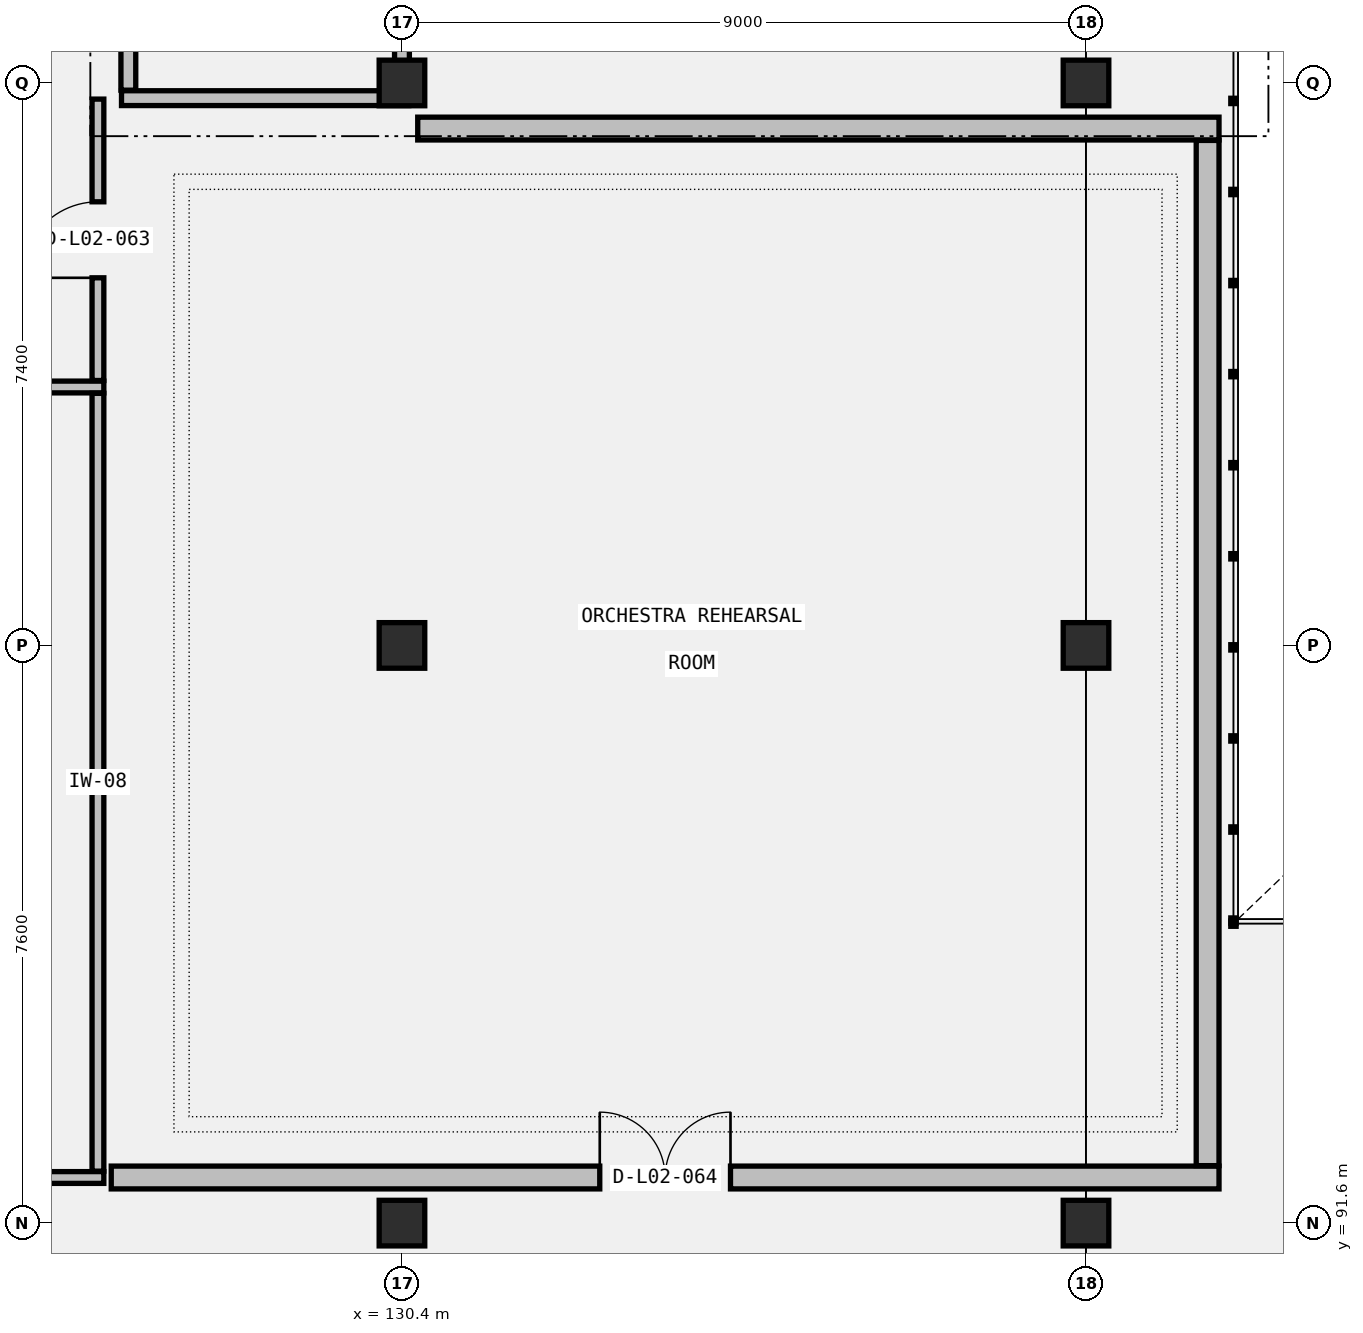
"""IFC4 building model, lengths in metres.
Left out: names, types, materials, properties, quantities, classifications, styles, units other than length and angle.
Written with IfcOpenShell. Run it as: python <this file> out.ifc"""

import sys

from ifc_helpers import new_model, si_unit, direction, frame, frame_2d, origin, origin_2d, place, context, subcontext, project, spatial, rectangle, extrude, element, fill, save


model = new_model("IFC4")
c1 = context("Model", 3, precision=1e-05, world=origin(), true_north=direction((0.0, 1.0)))
c2 = subcontext(c1, "Body", "Model", "MODEL_VIEW")
j1 = project(units=[si_unit("LENGTHUNIT", "METRE"), si_unit("PLANEANGLEUNIT", "RADIAN")], contexts=[c1])
p1 = place(None, origin())
s1 = spatial("IfcSite", under=j1, at=p1, CompositionType="ELEMENT")
p2 = place(p1, origin())
s2 = spatial("IfcBuilding", under=s1, at=p2, CompositionType="ELEMENT")
p3 = place(p2, frame((0.0, 0.0, 10.0)))
s3 = spatial("IfcBuildingStorey", under=s2, at=p3, CompositionType="ELEMENT", Elevation=10.0)
for number, where, z_axis, x_axis in (
    (1, (130.4, 91.6, 0.0), (0.0, 0.0, 1.0), (1.0, 0.0, 0.0)),
    (2, (130.4, 99.2, 0.0), (0.0, 0.0, 1.0), (1.0, 0.0, 0.0)),
    (3, (130.4, 106.6, 0.0), (0.0, 0.0, 1.0), (1.0, 0.0, 0.0)),
    (4, (139.4, 91.6, 0.0), (0.0, 0.0, 1.0), (1.0, 0.0, 0.0)),
    (5, (139.4, 99.2, 0.0), (0.0, 0.0, 1.0), (1.0, 0.0, 0.0)),
    (6, (139.4, 106.6, 0.0), (0.0, 0.0, 1.0), (1.0, 0.0, 0.0)),
):
    element("IfcColumn", number, at=place(p3, frame(where, z_axis=z_axis, x_axis=x_axis)), inside=s3, PredefinedType="COLUMN", context=c2, shape_type="SweptSolid", body=[
        extrude(rectangle(XDim=0.6, YDim=0.6, at=origin_2d()), origin(), (0.0, 0.0, 1.0), 4.6),
    ])
p4 = place(p3, frame((126.8, 106.505, 0.0), z_axis=(0.0, 0.0, 1.0), x_axis=(0.0, 1.0, 0.0)))
e7 = element("IfcWall", 7, at=p4, inside=s3, PredefinedType="PARTITIONING", context=c2, shape_type="SweptSolid", body=[
    extrude(rectangle(XDim=7.275, YDim=0.195, at=frame_2d((3.638, 0.0))), origin(), (0.0, 0.0, 1.0), 3.898),
])
p5 = place(p3, frame((126.71, 106.4, 0.0), z_axis=(0.0, 0.0, 1.0), x_axis=(1.0, 0.0, 0.0)))
e8 = element("IfcWall", 8, at=p5, inside=s3, PredefinedType="PARTITIONING", context=c2, shape_type="SweptSolid", body=[
    extrude(rectangle(XDim=3.78, YDim=0.195, at=frame_2d((1.89, 0.0))), origin(), (0.0, 0.0, 1.0), 3.738),
])
p6 = place(p3, frame((130.4, 106.505, 0.0), z_axis=(0.0, 0.0, 1.0), x_axis=(0.0, 1.0, 0.0)))
e9 = element("IfcWall", 9, at=p6, inside=s3, PredefinedType="PARTITIONING", context=c2, shape_type="SweptSolid", body=[
    extrude(rectangle(XDim=3.39, YDim=0.195, at=frame_2d((1.695, 0.0))), origin(), (0.0, 0.0, 1.0), 4.044),
])
p7 = place(p6, frame((0.945, 0.0, 0.0)))
e10 = element("IfcOpeningElement", 10, at=p7, cuts=e9, PredefinedType="OPENING", context=c2, shape_type="SweptSolid", body=[
    extrude(rectangle(XDim=1.5, YDim=2.2, at=frame_2d((0.75, 1.1))), frame((0.0, 0.107, 0.0), z_axis=(0.0, -1.0, 0.0), x_axis=(1.0, 0.0, 0.0)), (0.0, 0.0, 1.0), 0.215),
])
p8 = place(p3, frame((120.323, 92.2, 0.0), z_axis=(0.0, 0.0, 1.0), x_axis=(1.0, 0.0, 0.0)))
e11 = element("IfcWall", 11, at=p8, inside=s3, PredefinedType="PARTITIONING", context=c2, shape_type="SweptSolid", body=[
    extrude(rectangle(XDim=6.155, YDim=0.155, at=frame_2d((3.078, 0.0))), origin(), (0.0, 0.0, 1.0), 3.738),
])
p9 = place(p8, frame((2.577, 0.0, 0.0)))
e12 = element("IfcOpeningElement", 12, at=p9, cuts=e11, PredefinedType="OPENING", context=c2, shape_type="SweptSolid", body=[
    extrude(rectangle(XDim=1.0, YDim=2.15, at=frame_2d((0.5, 1.075))), frame((0.0, 0.087, 0.0), z_axis=(0.0, -1.0, 0.0), x_axis=(1.0, 0.0, 0.0)), (0.0, 0.0, 1.0), 0.175),
])
p10 = place(p3, frame((120.175, 102.6, 0.0), z_axis=(0.0, 0.0, 1.0), x_axis=(1.0, 0.0, 0.0)))
e13 = element("IfcWall", 13, at=p10, inside=s3, PredefinedType="PARTITIONING", context=c2, shape_type="SweptSolid", body=[
    extrude(rectangle(XDim=6.302, YDim=0.155, at=frame_2d((3.151, 0.0))), origin(), (0.0, 0.0, 1.0), 3.738),
])
p11 = place(p3, frame((126.4, 92.283, 0.0), z_axis=(0.0, 0.0, 1.0), x_axis=(0.0, 1.0, 0.0)))
e14 = element("IfcWall", 14, at=p11, inside=s3, PredefinedType="PARTITIONING", context=c2, shape_type="SweptSolid", body=[
    extrude(rectangle(XDim=10.233, YDim=0.155, at=frame_2d((5.117, 0.0))), origin(), (0.0, 0.0, 1.0), 3.898),
])
p12 = place(p3, frame((126.4, 102.686, 0.0), z_axis=(0.0, 0.0, 1.0), x_axis=(0.0, 1.0, 0.0)))
e15 = element("IfcWall", 15, at=p12, inside=s3, PredefinedType="PARTITIONING", context=c2, shape_type="SweptSolid", body=[
    extrude(rectangle(XDim=3.702, YDim=0.155, at=frame_2d((1.851, 0.0))), origin(), (0.0, 0.0, 1.0), 3.898),
])
p13 = place(p12, frame((1.351, 0.0, 0.0)))
e16 = element("IfcOpeningElement", 16, at=p13, cuts=e15, PredefinedType="OPENING", context=c2, shape_type="SweptSolid", body=[
    extrude(rectangle(XDim=1.0, YDim=2.15, at=frame_2d((0.5, 1.075))), frame((0.0, 0.087, 0.0), z_axis=(0.0, -1.0, 0.0), x_axis=(1.0, 0.0, 0.0)), (0.0, 0.0, 1.0), 0.175),
])
p14 = place(p3, frame((126.575, 92.2, 0.0), z_axis=(0.0, 0.0, 1.0), x_axis=(1.0, 0.0, 0.0)))
e17 = element("IfcWall", 17, at=p14, inside=s3, PredefinedType="PARTITIONING", context=c2, shape_type="SweptSolid", body=[
    extrude(rectangle(XDim=14.575, YDim=0.3, at=frame_2d((7.288, 0.0))), origin(), (0.0, 0.0, 1.0), 3.738),
])
p15 = place(p14, frame((6.427, 0.0, 0.0)))
e18 = element("IfcOpeningElement", 18, at=p15, cuts=e17, PredefinedType="OPENING", context=c2, shape_type="SweptSolid", body=[
    extrude(rectangle(XDim=1.72, YDim=2.38, at=frame_2d((0.86, 1.19))), frame((0.0, 0.16, 0.0), z_axis=(0.0, -1.0, 0.0), x_axis=(1.0, 0.0, 0.0)), (0.0, 0.0, 1.0), 0.32),
])
p16 = place(p3, frame((130.607, 106.0, 0.0), z_axis=(0.0, 0.0, 1.0), x_axis=(1.0, 0.0, 0.0)))
e19 = element("IfcWall", 19, at=p16, inside=s3, PredefinedType="PARTITIONING", context=c2, shape_type="SweptSolid", body=[
    extrude(rectangle(XDim=10.542, YDim=0.3, at=frame_2d((5.271, 0.0))), origin(), (0.0, 0.0, 1.0), 3.738),
])
p17 = place(p3, frame((141.0, 92.356, 0.0), z_axis=(0.0, 0.0, 1.0), x_axis=(0.0, 1.0, 0.0)))
e20 = element("IfcWall", 20, at=p17, inside=s3, PredefinedType="PARTITIONING", context=c2, shape_type="SweptSolid", body=[
    extrude(rectangle(XDim=13.488, YDim=0.3, at=frame_2d((6.744, 0.0))), origin(), (0.0, 0.0, 1.0), 3.898),
])
p18 = place(p13, origin())
e21 = element("IfcDoor", 21, at=p18, inside=s3, OperationType="SINGLE_SWING_LEFT", PredefinedType="DOOR", context=c2, shape_type="SweptSolid", body=[
    extrude(rectangle(XDim=1.0, YDim=2.15, at=frame_2d((0.5, 1.075))), frame((0.0, 0.025, 0.0), z_axis=(0.0, -1.0, 0.0), x_axis=(1.0, 0.0, 0.0)), (0.0, 0.0, 1.0), 0.05),
])
fill(e16, e21)
p19 = place(p15, origin())
e22 = element("IfcDoor", 22, at=p19, inside=s3, OperationType="DOUBLE_DOOR_SINGLE_SWING", PredefinedType="DOOR", context=c2, shape_type="SweptSolid", body=[
    extrude(rectangle(XDim=1.72, YDim=2.38, at=frame_2d((0.86, 1.19))), frame((0.0, 0.025, 0.0), z_axis=(0.0, -1.0, 0.0), x_axis=(1.0, 0.0, 0.0)), (0.0, 0.0, 1.0), 0.05),
])
fill(e18, e22)
save(model, sys.argv[1])
